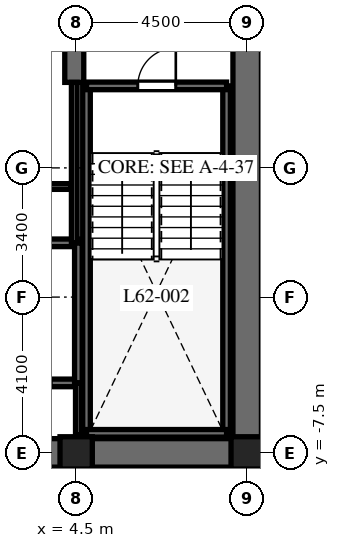
"""IFC4 building model, lengths in metres.
Left out: names, types, materials, properties, quantities, classifications, styles, units other than length and angle.
Written with IfcOpenShell. Run it as: python <this file> out.ifc"""

import sys

from ifc_helpers import new_model, si_unit, direction, frame, frame_2d, origin, origin_2d, place, context, subcontext, project, spatial, rectangle, extrude, element, fill, save


model = new_model("IFC4")
c1 = context("Model", 3, precision=1e-05, world=origin(), true_north=direction((0.0, 1.0)))
c2 = subcontext(c1, "Body", "Model", "MODEL_VIEW")
j1 = project(units=[si_unit("LENGTHUNIT", "METRE"), si_unit("PLANEANGLEUNIT", "RADIAN")], contexts=[c1])
p1 = place(None, origin())
s1 = spatial("IfcSite", under=j1, at=p1, CompositionType="ELEMENT")
p2 = place(p1, origin())
s2 = spatial("IfcBuilding", under=s1, at=p2, CompositionType="ELEMENT")
p3 = place(p2, frame((0.0, 0.0, 248.3)))
s3 = spatial("IfcBuildingStorey", under=s2, at=p3, CompositionType="ELEMENT", Elevation=248.3)
p4 = place(p3, frame((-9.375, -7.5, 0.0), z_axis=(0.0, 0.0, 1.0), x_axis=(1.0, 0.0, 0.0)))
e1 = element("IfcWall", 1, at=p4, inside=s3, PredefinedType="SHEAR", context=c2, shape_type="SweptSolid", body=[
    extrude(rectangle(XDim=18.75, YDim=0.75, at=frame_2d((9.375, 0.0))), origin(), (0.0, 0.0, 1.0), 3.8),
])
p5 = place(p4, frame((9.425, 0.0, 0.0)))
e2 = element("IfcOpeningElement", 2, at=p5, cuts=e1, PredefinedType="OPENING", context=c2, shape_type="SweptSolid", body=[
    extrude(rectangle(XDim=1.0, YDim=2.15, at=frame_2d((0.5, 1.075))), frame((0.0, 0.385, 0.0), z_axis=(0.0, -1.0, 0.0), x_axis=(1.0, 0.0, 0.0)), (0.0, 0.0, 1.0), 0.77),
])
p6 = place(p3, frame((9.0, -7.125, 0.0), z_axis=(0.0, 0.0, 1.0), x_axis=(0.0, 1.0, 0.0)))
e3 = element("IfcWall", 3, at=p6, inside=s3, PredefinedType="SHEAR", context=c2, shape_type="SweptSolid", body=[
    extrude(rectangle(XDim=14.25, YDim=0.75, at=frame_2d((7.125, 0.0))), origin(), (0.0, 0.0, 1.0), 3.8),
])
p7 = place(p6, frame((10.25, 0.0, 0.0)))
e4 = element("IfcOpeningElement", 4, at=p7, cuts=e3, PredefinedType="OPENING", context=c2, shape_type="SweptSolid", body=[
    extrude(rectangle(XDim=1.05, YDim=2.15, at=frame_2d((0.525, 1.075))), frame((0.0, 0.385, 0.0), z_axis=(0.0, -1.0, 0.0), x_axis=(1.0, 0.0, 0.0)), (0.0, 0.0, 1.0), 0.77),
])
p8 = place(p3, frame((4.45, 2.25, 0.0), z_axis=(0.0, 0.0, 1.0), x_axis=(0.0, 1.0, 0.0)))
e5 = element("IfcWall", 5, at=p8, inside=s3, PredefinedType="SHEAR", context=c2, shape_type="SweptSolid", body=[
    extrude(rectangle(XDim=4.875, YDim=0.5, at=frame_2d((2.438, 0.0))), origin(), (0.0, 0.0, 1.0), 3.8),
])
for number, where, z_axis, x_axis in (
    (6, (4.772, -6.985, 0.0), (0.0, 0.0, 1.0), (0.0, 1.0, 0.0)),
    (7, (8.458, -6.985, 0.0), (0.0, 0.0, 1.0), (0.0, 1.0, 0.0)),
):
    element("IfcWall", number, at=place(p3, frame(where, z_axis=z_axis, x_axis=x_axis)), inside=s3, PredefinedType="SHEAR", context=c2, shape_type="SweptSolid", body=[
        extrude(rectangle(XDim=9.143, YDim=0.2, at=frame_2d((4.572, 0.0))), origin(), (0.0, 0.0, 1.0), 3.8),
    ])
p9 = place(p3, frame((4.772, -6.985, 0.0), z_axis=(0.0, 0.0, 1.0), x_axis=(1.0, 0.0, 0.0)))
e8 = element("IfcWall", 8, at=p9, inside=s3, PredefinedType="SHEAR", context=c2, shape_type="SweptSolid", body=[
    extrude(rectangle(XDim=3.686, YDim=0.2, at=frame_2d((1.843, 0.0))), origin(), (0.0, 0.0, 1.0), 3.8),
])
p10 = place(p3, frame((4.772, 2.158, 0.0), z_axis=(0.0, 0.0, 1.0), x_axis=(1.0, 0.0, 0.0)))
e9 = element("IfcWall", 9, at=p10, inside=s3, PredefinedType="SHEAR", context=c2, shape_type="SweptSolid", body=[
    extrude(rectangle(XDim=3.686, YDim=0.2, at=frame_2d((1.843, 0.0))), origin(), (0.0, 0.0, 1.0), 3.8),
])
p11 = place(p10, frame((1.35, 0.0, 0.0)))
e10 = element("IfcOpeningElement", 10, at=p11, cuts=e9, PredefinedType="OPENING", context=c2, shape_type="SweptSolid", body=[
    extrude(rectangle(XDim=1.0, YDim=2.15, at=frame_2d((0.5, 1.075))), frame((0.0, 0.11, 0.0), z_axis=(0.0, -1.0, 0.0), x_axis=(1.0, 0.0, 0.0)), (0.0, 0.0, 1.0), 0.22),
])
p12 = place(p3, frame((-4.608, -5.658, 0.0), z_axis=(0.0, 0.0, 1.0), x_axis=(1.0, 0.0, 0.0)))
e11 = element("IfcWall", 11, at=p12, inside=s3, PredefinedType="SHEAR", context=c2, shape_type="SweptSolid", body=[
    extrude(rectangle(XDim=9.166, YDim=0.2, at=frame_2d((4.583, 0.0))), origin(), (0.0, 0.0, 1.0), 3.8),
])
p13 = place(p12, frame((7.45, 0.0, 0.0)))
e12 = element("IfcOpeningElement", 12, at=p13, cuts=e11, PredefinedType="OPENING", context=c2, shape_type="SweptSolid", body=[
    extrude(rectangle(XDim=1.0, YDim=2.15, at=frame_2d((0.5, 1.075))), frame((0.0, 0.11, 0.0), z_axis=(0.0, -1.0, 0.0), x_axis=(1.0, 0.0, 0.0)), (0.0, 0.0, 1.0), 0.22),
])
p14 = place(p3, frame((-4.608, -1.972, 0.0), z_axis=(0.0, 0.0, 1.0), x_axis=(1.0, 0.0, 0.0)))
e13 = element("IfcWall", 13, at=p14, inside=s3, PredefinedType="SHEAR", context=c2, shape_type="SweptSolid", body=[
    extrude(rectangle(XDim=9.166, YDim=0.2, at=frame_2d((4.583, 0.0))), origin(), (0.0, 0.0, 1.0), 3.8),
])
p15 = place(p3, frame((4.558, -5.658, 0.0), z_axis=(0.0, 0.0, 1.0), x_axis=(0.0, 1.0, 0.0)))
e14 = element("IfcWall", 14, at=p15, inside=s3, PredefinedType="SHEAR", context=c2, shape_type="SweptSolid", body=[
    extrude(rectangle(XDim=3.686, YDim=0.2, at=frame_2d((1.843, 0.0))), origin(), (0.0, 0.0, 1.0), 3.8),
])
for number, where, z_axis, x_axis in (
    (15, (4.5, -7.5, 0.0), (0.0, 0.0, 1.0), (1.0, 0.0, 0.0)),
    (16, (9.0, -7.5, 0.0), (0.0, 0.0, 1.0), (1.0, 0.0, 0.0)),
):
    element("IfcColumn", number, at=place(p3, frame(where, z_axis=z_axis, x_axis=x_axis)), inside=s3, PredefinedType="COLUMN", context=c2, shape_type="SweptSolid", body=[
        extrude(rectangle(XDim=0.85, YDim=0.85, at=origin_2d()), origin(), (0.0, 0.0, 1.0), 3.8),
    ])
p16 = place(p3, frame((4.558, -7.02, 0.0), z_axis=(0.0, 0.0, 1.0), x_axis=(0.0, 1.0, 0.0)))
e17 = element("IfcWall", 17, at=p16, inside=s3, PredefinedType="PARTITIONING", context=c2, shape_type="SweptSolid", body=[
    extrude(rectangle(XDim=1.362, YDim=0.15, at=frame_2d((0.681, 0.0))), origin(), (0.0, 0.0, 1.0), 3.5),
])
p17 = place(p3, frame((4.45, -1.972, 0.0), z_axis=(0.0, 0.0, 1.0), x_axis=(0.0, 1.0, 0.0)))
e18 = element("IfcWall", 18, at=p17, inside=s3, PredefinedType="PARTITIONING", context=c2, shape_type="SweptSolid", body=[
    extrude(rectangle(XDim=4.222, YDim=0.15, at=frame_2d((2.111, 0.0))), origin(), (0.0, 0.0, 1.0), 3.5),
])
p18 = place(p3, frame((-4.36, -0.49, 0.0), z_axis=(0.0, 0.0, 1.0), x_axis=(1.0, 0.0, 0.0)))
e19 = element("IfcWall", 19, at=p18, inside=s3, PredefinedType="PARTITIONING", context=c2, shape_type="SweptSolid", body=[
    extrude(rectangle(XDim=8.72, YDim=0.15, at=frame_2d((4.36, 0.0))), origin(), (0.0, 0.0, 1.0), 3.5),
])
p19 = place(p18, frame((3.16, 0.0, 0.0)))
e20 = element("IfcOpeningElement", 20, at=p19, cuts=e19, PredefinedType="OPENING", context=c2, shape_type="SweptSolid", body=[
    extrude(rectangle(XDim=0.85, YDim=2.03, at=frame_2d((0.425, 1.015))), frame((0.0, 0.085, 0.0), z_axis=(0.0, -1.0, 0.0), x_axis=(1.0, 0.0, 0.0)), (0.0, 0.0, 1.0), 0.17),
])
p20 = place(p18, frame((5.21, 0.0, 0.0)))
e21 = element("IfcOpeningElement", 21, at=p20, cuts=e19, PredefinedType="OPENING", context=c2, shape_type="SweptSolid", body=[
    extrude(rectangle(XDim=0.85, YDim=2.03, at=frame_2d((0.425, 1.015))), frame((0.0, 0.085, 0.0), z_axis=(0.0, -1.0, 0.0), x_axis=(1.0, 0.0, 0.0)), (0.0, 0.0, 1.0), 0.17),
])
p21 = place(p11, origin())
e22 = element("IfcDoor", 22, at=p21, inside=s3, OperationType="SINGLE_SWING_RIGHT", PredefinedType="DOOR", context=c2, shape_type="SweptSolid", body=[
    extrude(rectangle(XDim=1.0, YDim=2.15, at=frame_2d((0.5, 1.075))), frame((0.0, 0.025, 0.0), z_axis=(0.0, -1.0, 0.0), x_axis=(1.0, 0.0, 0.0)), (0.0, 0.0, 1.0), 0.05),
])
fill(e10, e22)
save(model, sys.argv[1])
